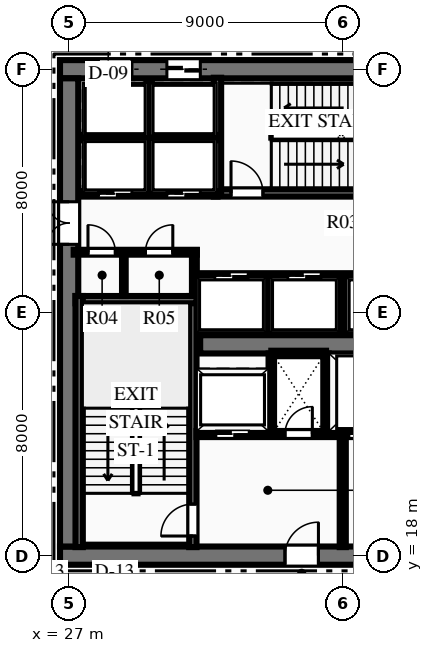
"""IFC4 building model, lengths in metres.
Left out: names, types, materials, properties, quantities, classifications, styles, units other than length and angle.
Written with IfcOpenShell. Run it as: python <this file> out.ifc"""

import sys

from ifc_helpers import new_model, si_unit, direction, frame, frame_2d, origin, place, context, subcontext, project, spatial, rectangle, extrude, element, fill, save


model = new_model("IFC4")
c1 = context("Model", 3, precision=1e-05, world=origin(), true_north=direction((0.0, 1.0)))
c2 = subcontext(c1, "Body", "Model", "MODEL_VIEW")
j1 = project(units=[si_unit("LENGTHUNIT", "METRE"), si_unit("PLANEANGLEUNIT", "RADIAN")], contexts=[c1])
p1 = place(None, origin())
s1 = spatial("IfcSite", under=j1, at=p1, CompositionType="ELEMENT")
p2 = place(p1, origin())
s2 = spatial("IfcBuilding", under=s1, at=p2, CompositionType="ELEMENT")
p3 = place(p2, frame((0.0, 0.0, 40.2)))
s3 = spatial("IfcBuildingStorey", under=s2, at=p3, CompositionType="ELEMENT", Elevation=40.2)
p4 = place(p3, frame((26.7, 18.0, 0.0), z_axis=(0.0, 0.0, 1.0), x_axis=(1.0, 0.0, 0.0)))
e1 = element("IfcWall", 1, at=p4, inside=s3, PredefinedType="SHEAR", context=c2, shape_type="SweptSolid", body=[
    extrude(rectangle(XDim=18.6, YDim=0.6, at=frame_2d((9.3, 0.0))), origin(), (0.0, 0.0, 1.0), 3.75),
])
p5 = place(p4, frame((7.4, 0.0, 0.0)))
e2 = element("IfcOpeningElement", 2, at=p5, cuts=e1, PredefinedType="OPENING", context=c2, shape_type="SweptSolid", body=[
    extrude(rectangle(XDim=1.1, YDim=2.15, at=frame_2d((0.55, 1.075))), frame((0.0, 0.31, 0.0), z_axis=(0.0, -1.0, 0.0), x_axis=(1.0, 0.0, 0.0)), (0.0, 0.0, 1.0), 0.62),
])
p6 = place(p4, frame((10.1, 0.0, 0.0)))
e3 = element("IfcOpeningElement", 3, at=p6, cuts=e1, PredefinedType="OPENING", context=c2, shape_type="SweptSolid", body=[
    extrude(rectangle(XDim=1.1, YDim=2.15, at=frame_2d((0.55, 1.075))), frame((0.0, 0.31, 0.0), z_axis=(0.0, -1.0, 0.0), x_axis=(1.0, 0.0, 0.0)), (0.0, 0.0, 1.0), 0.62),
])
p7 = place(p3, frame((26.7, 34.0, 0.0), z_axis=(0.0, 0.0, 1.0), x_axis=(1.0, 0.0, 0.0)))
e4 = element("IfcWall", 4, at=p7, inside=s3, PredefinedType="SHEAR", context=c2, shape_type="SweptSolid", body=[
    extrude(rectangle(XDim=18.6, YDim=0.6, at=frame_2d((9.3, 0.0))), origin(), (0.0, 0.0, 1.0), 3.75),
])
p8 = place(p7, frame((1.265, 0.0, 0.0)))
e5 = element("IfcOpeningElement", 5, at=p8, cuts=e4, PredefinedType="OPENING", context=c2, shape_type="SweptSolid", body=[
    extrude(rectangle(XDim=1.1, YDim=2.15, at=frame_2d((0.55, 1.075))), frame((0.0, 0.31, 0.0), z_axis=(0.0, -1.0, 0.0), x_axis=(1.0, 0.0, 0.0)), (0.0, 0.0, 1.0), 0.62),
])
p9 = place(p7, frame((3.515, 0.0, 0.0)))
e6 = element("IfcOpeningElement", 6, at=p9, cuts=e4, PredefinedType="OPENING", context=c2, shape_type="SweptSolid", body=[
    extrude(rectangle(XDim=1.1, YDim=2.15, at=frame_2d((0.55, 1.075))), frame((0.0, 0.31, 0.0), z_axis=(0.0, -1.0, 0.0), x_axis=(1.0, 0.0, 0.0)), (0.0, 0.0, 1.0), 0.62),
])
p10 = place(p7, frame((13.985, 0.0, 0.0)))
e7 = element("IfcOpeningElement", 7, at=p10, cuts=e4, PredefinedType="OPENING", context=c2, shape_type="SweptSolid", body=[
    extrude(rectangle(XDim=1.1, YDim=2.15, at=frame_2d((0.55, 1.075))), frame((0.0, 0.31, 0.0), z_axis=(0.0, -1.0, 0.0), x_axis=(1.0, 0.0, 0.0)), (0.0, 0.0, 1.0), 0.62),
])
p11 = place(p7, frame((16.235, 0.0, 0.0)))
e8 = element("IfcOpeningElement", 8, at=p11, cuts=e4, PredefinedType="OPENING", context=c2, shape_type="SweptSolid", body=[
    extrude(rectangle(XDim=1.1, YDim=2.15, at=frame_2d((0.55, 1.075))), frame((0.0, 0.31, 0.0), z_axis=(0.0, -1.0, 0.0), x_axis=(1.0, 0.0, 0.0)), (0.0, 0.0, 1.0), 0.62),
])
p12 = place(p3, frame((27.0, 18.3, 0.0), z_axis=(0.0, 0.0, 1.0), x_axis=(0.0, 1.0, 0.0)))
e9 = element("IfcWall", 9, at=p12, inside=s3, PredefinedType="SHEAR", context=c2, shape_type="SweptSolid", body=[
    extrude(rectangle(XDim=15.4, YDim=0.6, at=frame_2d((7.7, 0.0))), origin(), (0.0, 0.0, 1.0), 3.75),
])
p13 = place(p12, frame((9.94, 0.0, 0.0)))
e10 = element("IfcOpeningElement", 10, at=p13, cuts=e9, PredefinedType="OPENING", context=c2, shape_type="SweptSolid", body=[
    extrude(rectangle(XDim=1.4, YDim=2.2, at=frame_2d((0.7, 1.1))), frame((0.0, 0.31, 0.0), z_axis=(0.0, -1.0, 0.0), x_axis=(1.0, 0.0, 0.0)), (0.0, 0.0, 1.0), 0.62),
])
p14 = place(p3, frame((31.31, 24.95, 0.0), z_axis=(0.0, 0.0, 1.0), x_axis=(1.0, 0.0, 0.0)))
e11 = element("IfcWall", 11, at=p14, inside=s3, PredefinedType="SHEAR", context=c2, shape_type="SweptSolid", body=[
    extrude(rectangle(XDim=9.38, YDim=0.6, at=frame_2d((4.69, 0.0))), origin(), (0.0, 0.0, 1.0), 3.75),
])
p15 = place(p3, frame((31.07, 18.28, 0.0), z_axis=(0.0, 0.0, 1.0), x_axis=(0.0, 1.0, 0.0)))
e12 = element("IfcWall", 12, at=p15, inside=s3, PredefinedType="SHEAR", context=c2, shape_type="SweptSolid", body=[
    extrude(rectangle(XDim=8.26, YDim=0.24, at=frame_2d((4.13, 0.0))), origin(), (0.0, 0.0, 1.0), 3.75),
])
p16 = place(p15, frame((0.365, 0.0, 0.0)))
e13 = element("IfcOpeningElement", 13, at=p16, cuts=e12, PredefinedType="OPENING", context=c2, shape_type="SweptSolid", body=[
    extrude(rectangle(XDim=1.05, YDim=2.15, at=frame_2d((0.525, 1.075))), frame((0.0, 0.13, 0.0), z_axis=(0.0, -1.0, 0.0), x_axis=(1.0, 0.0, 0.0)), (0.0, 0.0, 1.0), 0.26),
])
p17 = place(p3, frame((27.21, 26.42, 0.0), z_axis=(0.0, 0.0, 1.0), x_axis=(1.0, 0.0, 0.0)))
e14 = element("IfcWall", 14, at=p17, inside=s3, PredefinedType="SHEAR", context=c2, shape_type="SweptSolid", body=[
    extrude(rectangle(XDim=3.98, YDim=0.24, at=frame_2d((1.99, 0.0))), origin(), (0.0, 0.0, 1.0), 3.75),
])
p18 = place(p3, frame((27.33, 18.28, 0.0), z_axis=(0.0, 0.0, 1.0), x_axis=(0.0, 1.0, 0.0)))
e15 = element("IfcWall", 15, at=p18, inside=s3, PredefinedType="SHEAR", context=c2, shape_type="SweptSolid", body=[
    extrude(rectangle(XDim=8.26, YDim=0.24, at=frame_2d((4.13, 0.0))), origin(), (0.0, 0.0, 1.0), 3.75),
])
p19 = place(p3, frame((31.76, 29.93, 0.0), z_axis=(0.0, 0.0, 1.0), x_axis=(1.0, 0.0, 0.0)))
e16 = element("IfcWall", 16, at=p19, inside=s3, PredefinedType="SHEAR", context=c2, shape_type="SweptSolid", body=[
    extrude(rectangle(XDim=8.38, YDim=0.24, at=frame_2d((4.19, 0.0))), origin(), (0.0, 0.0, 1.0), 3.75),
])
p20 = place(p19, frame((0.565, 0.0, 0.0)))
e17 = element("IfcOpeningElement", 17, at=p20, cuts=e16, PredefinedType="OPENING", context=c2, shape_type="SweptSolid", body=[
    extrude(rectangle(XDim=1.05, YDim=2.15, at=frame_2d((0.525, 1.075))), frame((0.0, 0.13, 0.0), z_axis=(0.0, -1.0, 0.0), x_axis=(1.0, 0.0, 0.0)), (0.0, 0.0, 1.0), 0.26),
])
p21 = place(p3, frame((31.88, 29.93, 0.0), z_axis=(0.0, 0.0, 1.0), x_axis=(0.0, 1.0, 0.0)))
e18 = element("IfcWall", 18, at=p21, inside=s3, PredefinedType="SHEAR", context=c2, shape_type="SweptSolid", body=[
    extrude(rectangle(XDim=3.79, YDim=0.24, at=frame_2d((1.895, 0.0))), origin(), (0.0, 0.0, 1.0), 3.75),
])
p22 = place(p3, frame((36.0, 18.28, 0.0), z_axis=(0.0, 0.0, 1.0), x_axis=(0.0, 1.0, 0.0)))
e19 = element("IfcWall", 19, at=p22, inside=s3, PredefinedType="PARTITIONING", context=c2, shape_type="SweptSolid", body=[
    extrude(rectangle(XDim=3.77, YDim=0.2, at=frame_2d((1.885, 0.0))), origin(), (0.0, 0.0, 1.0), 3.44),
])
p23 = place(p3, frame((31.19, 22.0, 0.0), z_axis=(0.0, 0.0, 1.0), x_axis=(1.0, 0.0, 0.0)))
e20 = element("IfcWall", 20, at=p23, inside=s3, PredefinedType="PARTITIONING", context=c2, shape_type="SweptSolid", body=[
    extrude(rectangle(XDim=4.69, YDim=0.2, at=frame_2d((2.345, 0.0))), origin(), (0.0, 0.0, 1.0), 3.44),
])
p24 = place(p23, frame((2.91, 0.0, 0.0)))
e21 = element("IfcOpeningElement", 21, at=p24, cuts=e20, PredefinedType="OPENING", context=c2, shape_type="SweptSolid", body=[
    extrude(rectangle(XDim=0.9, YDim=2.15, at=frame_2d((0.45, 1.075))), frame((0.0, 0.11, 0.0), z_axis=(0.0, -1.0, 0.0), x_axis=(1.0, 0.0, 0.0)), (0.0, 0.0, 1.0), 0.22),
])
p25 = place(p23, frame((0.635, 0.0, 0.0)))
e22 = element("IfcOpeningElement", 22, at=p25, cuts=e20, PredefinedType="OPENING", context=c2, shape_type="SweptSolid", body=[
    extrude(rectangle(XDim=1.1, YDim=2.15, at=frame_2d((0.55, 1.075))), frame((0.0, 0.11, 0.0), z_axis=(0.0, -1.0, 0.0), x_axis=(1.0, 0.0, 0.0)), (0.0, 0.0, 1.0), 0.22),
])
p26 = place(p3, frame((36.12, 22.0, 0.0), z_axis=(0.0, 0.0, 1.0), x_axis=(1.0, 0.0, 0.0)))
e23 = element("IfcWall", 23, at=p26, inside=s3, PredefinedType="PARTITIONING", context=c2, shape_type="SweptSolid", body=[
    extrude(rectangle(XDim=4.69, YDim=0.2, at=frame_2d((2.345, 0.0))), origin(), (0.0, 0.0, 1.0), 3.44),
])
p27 = place(p26, frame((2.955, 0.0, 0.0)))
e24 = element("IfcOpeningElement", 24, at=p27, cuts=e23, PredefinedType="OPENING", context=c2, shape_type="SweptSolid", body=[
    extrude(rectangle(XDim=1.1, YDim=2.15, at=frame_2d((0.55, 1.075))), frame((0.0, 0.11, 0.0), z_axis=(0.0, -1.0, 0.0), x_axis=(1.0, 0.0, 0.0)), (0.0, 0.0, 1.0), 0.22),
])
p28 = place(p26, frame((0.08, 0.0, 0.0)))
e25 = element("IfcOpeningElement", 25, at=p28, cuts=e23, PredefinedType="OPENING", context=c2, shape_type="SweptSolid", body=[
    extrude(rectangle(XDim=1.4, YDim=2.2, at=frame_2d((0.7, 1.1))), frame((0.0, 0.11, 0.0), z_axis=(0.0, -1.0, 0.0), x_axis=(1.0, 0.0, 0.0)), (0.0, 0.0, 1.0), 0.22),
])
for number, where, z_axis, x_axis in (
    (26, (33.65, 22.05, 0.0), (0.0, 0.0, 1.0), (0.0, 1.0, 0.0)),
    (27, (35.45, 22.05, 0.0), (0.0, 0.0, 1.0), (0.0, 1.0, 0.0)),
):
    element("IfcWall", number, at=place(p3, frame(where, z_axis=z_axis, x_axis=x_axis)), inside=s3, PredefinedType="PARTITIONING", context=c2, shape_type="SweptSolid", body=[
        extrude(rectangle(XDim=2.6, YDim=0.18, at=frame_2d((1.3, 0.0))), origin(), (0.0, 0.0, 1.0), 3.44),
    ])
p29 = place(p3, frame((33.65, 24.65, 0.0), z_axis=(0.0, 0.0, 1.0), x_axis=(1.0, 0.0, 0.0)))
e28 = element("IfcWall", 28, at=p29, inside=s3, PredefinedType="PARTITIONING", context=c2, shape_type="SweptSolid", body=[
    extrude(rectangle(XDim=1.8, YDim=0.18, at=frame_2d((0.9, 0.0))), origin(), (0.0, 0.0, 1.0), 3.44),
])
p30 = place(p3, frame((27.15, 27.98, 0.0), z_axis=(0.0, 0.0, 1.0), x_axis=(1.0, 0.0, 0.0)))
e29 = element("IfcWall", 29, at=p30, inside=s3, PredefinedType="PARTITIONING", context=c2, shape_type="SweptSolid", body=[
    extrude(rectangle(XDim=4.05, YDim=0.16, at=frame_2d((2.025, 0.0))), origin(), (0.0, 0.0, 1.0), 3.44),
])
p31 = place(p30, frame((0.47, 0.0, 0.0)))
e30 = element("IfcOpeningElement", 30, at=p31, cuts=e29, PredefinedType="OPENING", context=c2, shape_type="SweptSolid", body=[
    extrude(rectangle(XDim=0.9, YDim=2.15, at=frame_2d((0.45, 1.075))), frame((0.0, 0.09, 0.0), z_axis=(0.0, -1.0, 0.0), x_axis=(1.0, 0.0, 0.0)), (0.0, 0.0, 1.0), 0.18),
])
p32 = place(p30, frame((2.36, 0.0, 0.0)))
e31 = element("IfcOpeningElement", 31, at=p32, cuts=e29, PredefinedType="OPENING", context=c2, shape_type="SweptSolid", body=[
    extrude(rectangle(XDim=0.9, YDim=2.15, at=frame_2d((0.45, 1.075))), frame((0.0, 0.09, 0.0), z_axis=(0.0, -1.0, 0.0), x_axis=(1.0, 0.0, 0.0)), (0.0, 0.0, 1.0), 0.18),
])
p33 = place(p3, frame((31.12, 26.54, 0.0), z_axis=(0.0, 0.0, 1.0), x_axis=(0.0, 1.0, 0.0)))
e32 = element("IfcWall", 32, at=p33, inside=s3, PredefinedType="PARTITIONING", context=c2, shape_type="SweptSolid", body=[
    extrude(rectangle(XDim=1.51, YDim=0.16, at=frame_2d((0.755, 0.0))), origin(), (0.0, 0.0, 1.0), 3.44),
])
p34 = place(p3, frame((28.8, 26.54, 0.0), z_axis=(0.0, 0.0, 1.0), x_axis=(0.0, 1.0, 0.0)))
e33 = element("IfcWall", 33, at=p34, inside=s3, PredefinedType="PARTITIONING", context=c2, shape_type="SweptSolid", body=[
    extrude(rectangle(XDim=1.44, YDim=0.12, at=frame_2d((0.72, 0.0))), origin(), (0.0, 0.0, 1.0), 3.44),
])
p35 = place(p3, frame((27.45, 29.9, 0.0), z_axis=(0.0, 0.0, 1.0), x_axis=(1.0, 0.0, 0.0)))
e34 = element("IfcWall", 34, at=p35, inside=s3, PredefinedType="PARTITIONING", context=c2, shape_type="SweptSolid", body=[
    extrude(rectangle(XDim=4.43, YDim=0.18, at=frame_2d((2.215, 0.0))), origin(), (0.0, 0.0, 1.0), 3.44),
])
p36 = place(p35, frame((0.515, 0.0, 0.0)))
e35 = element("IfcOpeningElement", 35, at=p36, cuts=e34, PredefinedType="OPENING", context=c2, shape_type="SweptSolid", body=[
    extrude(rectangle(XDim=1.1, YDim=2.15, at=frame_2d((0.55, 1.075))), frame((0.0, 0.1, 0.0), z_axis=(0.0, -1.0, 0.0), x_axis=(1.0, 0.0, 0.0)), (0.0, 0.0, 1.0), 0.2),
])
p37 = place(p35, frame((2.765, 0.0, 0.0)))
e36 = element("IfcOpeningElement", 36, at=p37, cuts=e34, PredefinedType="OPENING", context=c2, shape_type="SweptSolid", body=[
    extrude(rectangle(XDim=1.1, YDim=2.15, at=frame_2d((0.55, 1.075))), frame((0.0, 0.1, 0.0), z_axis=(0.0, -1.0, 0.0), x_axis=(1.0, 0.0, 0.0)), (0.0, 0.0, 1.0), 0.2),
])
p38 = place(p3, frame((27.45, 31.75, 0.0), z_axis=(0.0, 0.0, 1.0), x_axis=(1.0, 0.0, 0.0)))
e37 = element("IfcWall", 37, at=p38, inside=s3, PredefinedType="PARTITIONING", context=c2, shape_type="SweptSolid", body=[
    extrude(rectangle(XDim=4.43, YDim=0.18, at=frame_2d((2.215, 0.0))), origin(), (0.0, 0.0, 1.0), 3.44),
])
p39 = place(p3, frame((29.63, 29.9, 0.0), z_axis=(0.0, 0.0, 1.0), x_axis=(0.0, 1.0, 0.0)))
e38 = element("IfcWall", 38, at=p39, inside=s3, PredefinedType="PARTITIONING", context=c2, shape_type="SweptSolid", body=[
    extrude(rectangle(XDim=3.75, YDim=0.18, at=frame_2d((1.875, 0.0))), origin(), (0.0, 0.0, 1.0), 3.44),
])
p40 = place(p3, frame((31.2, 27.2, 0.0), z_axis=(0.0, 0.0, 1.0), x_axis=(1.0, 0.0, 0.0)))
e39 = element("IfcWall", 39, at=p40, inside=s3, PredefinedType="PARTITIONING", context=c2, shape_type="SweptSolid", body=[
    extrude(rectangle(XDim=9.6, YDim=0.18, at=frame_2d((4.8, 0.0))), origin(), (0.0, 0.0, 1.0), 3.44),
])
p41 = place(p40, frame((0.59, 0.0, 0.0)))
e40 = element("IfcOpeningElement", 40, at=p41, cuts=e39, PredefinedType="OPENING", context=c2, shape_type="SweptSolid", body=[
    extrude(rectangle(XDim=1.1, YDim=2.15, at=frame_2d((0.55, 1.075))), frame((0.0, 0.1, 0.0), z_axis=(0.0, -1.0, 0.0), x_axis=(1.0, 0.0, 0.0)), (0.0, 0.0, 1.0), 0.2),
])
p42 = place(p40, frame((2.99, 0.0, 0.0)))
e41 = element("IfcOpeningElement", 41, at=p42, cuts=e39, PredefinedType="OPENING", context=c2, shape_type="SweptSolid", body=[
    extrude(rectangle(XDim=1.1, YDim=2.15, at=frame_2d((0.55, 1.075))), frame((0.0, 0.1, 0.0), z_axis=(0.0, -1.0, 0.0), x_axis=(1.0, 0.0, 0.0)), (0.0, 0.0, 1.0), 0.2),
])
p43 = place(p40, frame((5.51, 0.0, 0.0)))
e42 = element("IfcOpeningElement", 42, at=p43, cuts=e39, PredefinedType="OPENING", context=c2, shape_type="SweptSolid", body=[
    extrude(rectangle(XDim=1.1, YDim=2.15, at=frame_2d((0.55, 1.075))), frame((0.0, 0.1, 0.0), z_axis=(0.0, -1.0, 0.0), x_axis=(1.0, 0.0, 0.0)), (0.0, 0.0, 1.0), 0.2),
])
p44 = place(p40, frame((7.91, 0.0, 0.0)))
e43 = element("IfcOpeningElement", 43, at=p44, cuts=e39, PredefinedType="OPENING", context=c2, shape_type="SweptSolid", body=[
    extrude(rectangle(XDim=1.1, YDim=2.15, at=frame_2d((0.55, 1.075))), frame((0.0, 0.1, 0.0), z_axis=(0.0, -1.0, 0.0), x_axis=(1.0, 0.0, 0.0)), (0.0, 0.0, 1.0), 0.2),
])
for number, where, z_axis, x_axis in (
    (44, (33.54, 25.3, 0.0), (0.0, 0.0, 1.0), (0.0, 1.0, 0.0)),
    (45, (36.0, 25.3, 0.0), (0.0, 0.0, 1.0), (0.0, 1.0, 0.0)),
):
    element("IfcWall", number, at=place(p3, frame(where, z_axis=z_axis, x_axis=x_axis)), inside=s3, PredefinedType="PARTITIONING", context=c2, shape_type="SweptSolid", body=[
        extrude(rectangle(XDim=1.9, YDim=0.18, at=frame_2d((0.95, 0.0))), origin(), (0.0, 0.0, 1.0), 3.44),
    ])
p45 = place(p31, origin())
e46 = element("IfcDoor", 46, at=p45, inside=s3, OperationType="SINGLE_SWING_LEFT", PredefinedType="DOOR", context=c2, shape_type="SweptSolid", body=[
    extrude(rectangle(XDim=0.9, YDim=2.15, at=frame_2d((0.45, 1.075))), frame((0.0, 0.025, 0.0), z_axis=(0.0, -1.0, 0.0), x_axis=(1.0, 0.0, 0.0)), (0.0, 0.0, 1.0), 0.05),
])
fill(e30, e46)
p46 = place(p32, origin())
e47 = element("IfcDoor", 47, at=p46, inside=s3, OperationType="SINGLE_SWING_RIGHT", PredefinedType="DOOR", context=c2, shape_type="SweptSolid", body=[
    extrude(rectangle(XDim=0.9, YDim=2.15, at=frame_2d((0.45, 1.075))), frame((0.0, 0.025, 0.0), z_axis=(0.0, -1.0, 0.0), x_axis=(1.0, 0.0, 0.0)), (0.0, 0.0, 1.0), 0.05),
])
fill(e31, e47)
p47 = place(p16, origin())
e48 = element("IfcDoor", 48, at=p47, inside=s3, OperationType="SINGLE_SWING_LEFT", PredefinedType="DOOR", context=c2, shape_type="SweptSolid", body=[
    extrude(rectangle(XDim=1.05, YDim=2.15, at=frame_2d((0.525, 1.075))), frame((0.0, 0.025, 0.0), z_axis=(0.0, -1.0, 0.0), x_axis=(1.0, 0.0, 0.0)), (0.0, 0.0, 1.0), 0.05),
])
fill(e13, e48)
p48 = place(p20, origin())
e49 = element("IfcDoor", 49, at=p48, inside=s3, OperationType="SINGLE_SWING_LEFT", PredefinedType="DOOR", context=c2, shape_type="SweptSolid", body=[
    extrude(rectangle(XDim=1.05, YDim=2.15, at=frame_2d((0.525, 1.075))), frame((0.0, 0.025, 0.0), z_axis=(0.0, -1.0, 0.0), x_axis=(1.0, 0.0, 0.0)), (0.0, 0.0, 1.0), 0.05),
])
fill(e17, e49)
p49 = place(p5, origin())
e50 = element("IfcDoor", 50, at=p49, inside=s3, OperationType="SINGLE_SWING_RIGHT", PredefinedType="DOOR", context=c2, shape_type="SweptSolid", body=[
    extrude(rectangle(XDim=1.1, YDim=2.15, at=frame_2d((0.55, 1.075))), frame((0.0, 0.025, 0.0), z_axis=(0.0, -1.0, 0.0), x_axis=(1.0, 0.0, 0.0)), (0.0, 0.0, 1.0), 0.05),
])
fill(e2, e50)
p50 = place(p24, origin())
e51 = element("IfcDoor", 51, at=p50, inside=s3, OperationType="SINGLE_SWING_RIGHT", PredefinedType="DOOR", context=c2, shape_type="SweptSolid", body=[
    extrude(rectangle(XDim=0.9, YDim=2.15, at=frame_2d((0.45, 1.075))), frame((0.0, 0.025, 0.0), z_axis=(0.0, -1.0, 0.0), x_axis=(1.0, 0.0, 0.0)), (0.0, 0.0, 1.0), 0.05),
])
fill(e21, e51)
p51 = place(p13, origin())
e52 = element("IfcDoor", 52, at=p51, inside=s3, OperationType="DOUBLE_DOOR_SINGLE_SWING", PredefinedType="DOOR", context=c2, shape_type="SweptSolid", body=[
    extrude(rectangle(XDim=1.4, YDim=2.2, at=frame_2d((0.7, 1.1))), frame((0.0, 0.025, 0.0), z_axis=(0.0, -1.0, 0.0), x_axis=(1.0, 0.0, 0.0)), (0.0, 0.0, 1.0), 0.05),
])
fill(e10, e52)
p52 = place(p36, origin())
e53 = element("IfcDoor", 53, at=p52, inside=s3, OperationType="SLIDING_TO_LEFT", PredefinedType="DOOR", context=c2, shape_type="SweptSolid", body=[
    extrude(rectangle(XDim=1.1, YDim=2.15, at=frame_2d((0.55, 1.075))), frame((0.0, 0.025, 0.0), z_axis=(0.0, -1.0, 0.0), x_axis=(1.0, 0.0, 0.0)), (0.0, 0.0, 1.0), 0.05),
])
fill(e35, e53)
p53 = place(p37, origin())
e54 = element("IfcDoor", 54, at=p53, inside=s3, OperationType="SLIDING_TO_LEFT", PredefinedType="DOOR", context=c2, shape_type="SweptSolid", body=[
    extrude(rectangle(XDim=1.1, YDim=2.15, at=frame_2d((0.55, 1.075))), frame((0.0, 0.025, 0.0), z_axis=(0.0, -1.0, 0.0), x_axis=(1.0, 0.0, 0.0)), (0.0, 0.0, 1.0), 0.05),
])
fill(e36, e54)
p54 = place(p8, origin())
e55 = element("IfcDoor", 55, at=p54, inside=s3, OperationType="SLIDING_TO_LEFT", PredefinedType="DOOR", context=c2, shape_type="SweptSolid", body=[
    extrude(rectangle(XDim=1.1, YDim=2.15, at=frame_2d((0.55, 1.075))), frame((0.0, 0.025, 0.0), z_axis=(0.0, -1.0, 0.0), x_axis=(1.0, 0.0, 0.0)), (0.0, 0.0, 1.0), 0.05),
])
fill(e5, e55)
p55 = place(p9, origin())
e56 = element("IfcDoor", 56, at=p55, inside=s3, OperationType="SLIDING_TO_LEFT", PredefinedType="DOOR", context=c2, shape_type="SweptSolid", body=[
    extrude(rectangle(XDim=1.1, YDim=2.15, at=frame_2d((0.55, 1.075))), frame((0.0, 0.025, 0.0), z_axis=(0.0, -1.0, 0.0), x_axis=(1.0, 0.0, 0.0)), (0.0, 0.0, 1.0), 0.05),
])
fill(e6, e56)
p56 = place(p41, origin())
e57 = element("IfcDoor", 57, at=p56, inside=s3, OperationType="SLIDING_TO_LEFT", PredefinedType="DOOR", context=c2, shape_type="SweptSolid", body=[
    extrude(rectangle(XDim=1.1, YDim=2.15, at=frame_2d((0.55, 1.075))), frame((0.0, 0.025, 0.0), z_axis=(0.0, -1.0, 0.0), x_axis=(1.0, 0.0, 0.0)), (0.0, 0.0, 1.0), 0.05),
])
fill(e40, e57)
p57 = place(p42, origin())
e58 = element("IfcDoor", 58, at=p57, inside=s3, OperationType="SLIDING_TO_LEFT", PredefinedType="DOOR", context=c2, shape_type="SweptSolid", body=[
    extrude(rectangle(XDim=1.1, YDim=2.15, at=frame_2d((0.55, 1.075))), frame((0.0, 0.025, 0.0), z_axis=(0.0, -1.0, 0.0), x_axis=(1.0, 0.0, 0.0)), (0.0, 0.0, 1.0), 0.05),
])
fill(e41, e58)
p58 = place(p25, origin())
e59 = element("IfcDoor", 59, at=p58, inside=s3, OperationType="SLIDING_TO_LEFT", PredefinedType="DOOR", context=c2, shape_type="SweptSolid", body=[
    extrude(rectangle(XDim=1.1, YDim=2.15, at=frame_2d((0.55, 1.075))), frame((0.0, 0.025, 0.0), z_axis=(0.0, -1.0, 0.0), x_axis=(1.0, 0.0, 0.0)), (0.0, 0.0, 1.0), 0.05),
])
fill(e22, e59)
p59 = place(p28, origin())
e60 = element("IfcDoor", 60, at=p59, inside=s3, OperationType="SLIDING_TO_LEFT", PredefinedType="DOOR", context=c2, shape_type="SweptSolid", body=[
    extrude(rectangle(XDim=1.4, YDim=2.2, at=frame_2d((0.7, 1.1))), frame((0.0, 0.025, 0.0), z_axis=(0.0, -1.0, 0.0), x_axis=(1.0, 0.0, 0.0)), (0.0, 0.0, 1.0), 0.05),
])
fill(e25, e60)
save(model, sys.argv[1])
